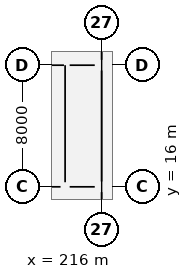
"""IFC4 building model, lengths in metres.
Left out: names, types, materials, properties, quantities, classifications, styles, units other than length and angle.
Written with IfcOpenShell. Run it as: python <this file> out.ifc"""

import sys

from ifc_helpers import new_model, si_unit, direction, frame, frame_2d, origin, origin_2d, place, context, subcontext, project, spatial, rectangle, extrude, element, fill, save


model = new_model("IFC4")
c1 = context("Model", 3, precision=1e-05, world=origin(), true_north=direction((0.0, 1.0)))
c2 = subcontext(c1, "Body", "Model", "MODEL_VIEW")
j1 = project(units=[si_unit("LENGTHUNIT", "METRE"), si_unit("PLANEANGLEUNIT", "RADIAN")], contexts=[c1])
p1 = place(None, origin())
s1 = spatial("IfcSite", under=j1, at=p1, CompositionType="ELEMENT")
p2 = place(p1, origin())
s2 = spatial("IfcBuilding", under=s1, at=p2, CompositionType="ELEMENT")
p3 = place(p2, origin())
s3 = spatial("IfcBuildingStorey", under=s2, at=p3, CompositionType="ELEMENT", Elevation=0.0)
for number, where, z_axis, x_axis in (
    (1, (216.0, 16.0, -0.5), (0.0, 0.0, 1.0), (1.0, 0.0, 0.0)),
    (2, (216.0, 24.0, -0.5), (0.0, 0.0, 1.0), (1.0, 0.0, 0.0)),
):
    element("IfcColumn", number, at=place(p3, frame(where, z_axis=z_axis, x_axis=x_axis)), inside=s3, PredefinedType="COLUMN", context=c2, shape_type="SweptSolid", body=[
        extrude(rectangle(XDim=0.7, YDim=0.7, at=origin_2d()), origin(), (0.0, 0.0, 1.0), 6.8),
    ])
p4 = place(p3, frame((216.0, 8.35, 0.0), z_axis=(0.0, 0.0, 1.0), x_axis=(0.0, 1.0, 0.0)))
e3 = element("IfcWall", 3, at=p4, inside=s3, PredefinedType="SOLIDWALL", context=c2, shape_type="SweptSolid", body=[
    extrude(rectangle(XDim=7.3, YDim=0.34, at=frame_2d((3.65, 0.0))), origin(), (0.0, 0.0, 1.0), 5.1),
])
p5 = place(p4, frame((1.433, 0.0, 0.85)))
e4 = element("IfcOpeningElement", 4, at=p5, cuts=e3, PredefinedType="OPENING", context=c2, shape_type="SweptSolid", body=[
    extrude(rectangle(XDim=2.0, YDim=3.3, at=frame_2d((1.0, 1.65))), frame((0.0, 0.18, 0.0), z_axis=(0.0, -1.0, 0.0), x_axis=(1.0, 0.0, 0.0)), (0.0, 0.0, 1.0), 0.36),
])
p6 = place(p4, frame((3.867, 0.0, 0.85)))
e5 = element("IfcOpeningElement", 5, at=p6, cuts=e3, PredefinedType="OPENING", context=c2, shape_type="SweptSolid", body=[
    extrude(rectangle(XDim=2.0, YDim=3.3, at=frame_2d((1.0, 1.65))), frame((0.0, 0.18, 0.0), z_axis=(0.0, -1.0, 0.0), x_axis=(1.0, 0.0, 0.0)), (0.0, 0.0, 1.0), 0.36),
])
p7 = place(p3, frame((216.0, 16.35, 0.0), z_axis=(0.0, 0.0, 1.0), x_axis=(0.0, 1.0, 0.0)))
e6 = element("IfcWall", 6, at=p7, inside=s3, PredefinedType="SOLIDWALL", context=c2, shape_type="SweptSolid", body=[
    extrude(rectangle(XDim=7.3, YDim=0.34, at=frame_2d((3.65, 0.0))), origin(), (0.0, 0.0, 1.0), 5.1),
])
p8 = place(p7, frame((2.45, 0.0, 0.0)))
e7 = element("IfcOpeningElement", 7, at=p8, cuts=e6, PredefinedType="OPENING", context=c2, shape_type="SweptSolid", body=[
    extrude(rectangle(XDim=2.4, YDim=3.1, at=frame_2d((1.2, 1.55))), frame((0.0, 0.18, 0.0), z_axis=(0.0, -1.0, 0.0), x_axis=(1.0, 0.0, 0.0)), (0.0, 0.0, 1.0), 0.36),
])
p9 = place(p3, frame((216.0, 24.35, 0.0), z_axis=(0.0, 0.0, 1.0), x_axis=(0.0, 1.0, 0.0)))
e8 = element("IfcWall", 8, at=p9, inside=s3, PredefinedType="SOLIDWALL", context=c2, shape_type="SweptSolid", body=[
    extrude(rectangle(XDim=7.3, YDim=0.34, at=frame_2d((3.65, 0.0))), origin(), (0.0, 0.0, 1.0), 5.1),
])
p10 = place(p9, frame((0.937, 0.0, 0.85)))
e9 = element("IfcOpeningElement", 9, at=p10, cuts=e8, PredefinedType="OPENING", context=c2, shape_type="SweptSolid", body=[
    extrude(rectangle(XDim=2.0, YDim=3.3, at=frame_2d((1.0, 1.65))), frame((0.0, 0.18, 0.0), z_axis=(0.0, -1.0, 0.0), x_axis=(1.0, 0.0, 0.0)), (0.0, 0.0, 1.0), 0.36),
])
p11 = place(p9, frame((3.867, 0.0, 0.85)))
e10 = element("IfcOpeningElement", 10, at=p11, cuts=e8, PredefinedType="OPENING", context=c2, shape_type="SweptSolid", body=[
    extrude(rectangle(XDim=2.0, YDim=3.3, at=frame_2d((1.0, 1.65))), frame((0.0, 0.18, 0.0), z_axis=(0.0, -1.0, 0.0), x_axis=(1.0, 0.0, 0.0)), (0.0, 0.0, 1.0), 0.36),
])
p12 = place(p3, frame((211.8, 16.0, 0.0), z_axis=(0.0, 0.0, 1.0), x_axis=(1.0, 0.0, 0.0)))
e11 = element("IfcWall", 11, at=p12, inside=s3, PredefinedType="PARTITIONING", context=c2, shape_type="SweptSolid", body=[
    extrude(rectangle(XDim=1.5, YDim=0.135, at=frame_2d((0.75, 0.0))), origin(), (0.0, 0.0, 1.0), 5.25),
])
p13 = place(p3, frame((213.9, 16.0, 0.0), z_axis=(0.0, 0.0, 1.0), x_axis=(1.0, 0.0, 0.0)))
e12 = element("IfcWall", 12, at=p13, inside=s3, PredefinedType="PARTITIONING", context=c2, shape_type="SweptSolid", body=[
    extrude(rectangle(XDim=1.65, YDim=0.14, at=frame_2d((0.825, 0.0))), origin(), (0.0, 0.0, 1.0), 5.25),
])
p14 = place(p3, frame((211.8, 24.0, 0.0), z_axis=(0.0, 0.0, 1.0), x_axis=(1.0, 0.0, 0.0)))
e13 = element("IfcWall", 13, at=p14, inside=s3, PredefinedType="PARTITIONING", context=c2, shape_type="SweptSolid", body=[
    extrude(rectangle(XDim=1.725, YDim=0.135, at=frame_2d((0.862, 0.0))), origin(), (0.0, 0.0, 1.0), 5.1),
])
p15 = place(p14, frame((0.225, 0.0, 0.0)))
e14 = element("IfcOpeningElement", 14, at=p15, cuts=e13, PredefinedType="OPENING", context=c2, shape_type="SweptSolid", body=[
    extrude(rectangle(XDim=1.05, YDim=2.15, at=frame_2d((0.525, 1.075))), frame((0.0, 0.077, 0.0), z_axis=(0.0, -1.0, 0.0), x_axis=(1.0, 0.0, 0.0)), (0.0, 0.0, 1.0), 0.155),
])
p16 = place(p3, frame((213.9, 24.0, 0.0), z_axis=(0.0, 0.0, 1.0), x_axis=(1.0, 0.0, 0.0)))
e15 = element("IfcWall", 15, at=p16, inside=s3, PredefinedType="PARTITIONING", context=c2, shape_type="SweptSolid", body=[
    extrude(rectangle(XDim=1.65, YDim=0.14, at=frame_2d((0.825, 0.0))), origin(), (0.0, 0.0, 1.0), 5.1),
])
p17 = place(p16, frame((0.315, 0.0, 0.0)))
e16 = element("IfcOpeningElement", 16, at=p17, cuts=e15, PredefinedType="OPENING", context=c2, shape_type="SweptSolid", body=[
    extrude(rectangle(XDim=1.02, YDim=2.18, at=frame_2d((0.51, 1.09))), frame((0.0, 0.08, 0.0), z_axis=(0.0, -1.0, 0.0), x_axis=(1.0, 0.0, 0.0)), (0.0, 0.0, 1.0), 0.16),
])
p18 = place(p3, frame((213.6, 16.3, 0.0), z_axis=(0.0, 0.0, 1.0), x_axis=(0.0, 1.0, 0.0)))
e17 = element("IfcWall", 17, at=p18, inside=s3, PredefinedType="PARTITIONING", context=c2, shape_type="SweptSolid", body=[
    extrude(rectangle(XDim=7.7, YDim=0.15, at=frame_2d((3.85, 0.0))), origin(), (0.0, 0.0, 1.0), 5.95),
])
p19 = place(p8, origin())
e18 = element("IfcDoor", 18, at=p19, inside=s3, OperationType="DOUBLE_DOOR_SINGLE_SWING", PredefinedType="DOOR", context=c2, shape_type="SweptSolid", body=[
    extrude(rectangle(XDim=2.4, YDim=3.1, at=frame_2d((1.2, 1.55))), frame((0.0, 0.025, 0.0), z_axis=(0.0, -1.0, 0.0), x_axis=(1.0, 0.0, 0.0)), (0.0, 0.0, 1.0), 0.05),
])
fill(e7, e18)
p20 = place(p15, origin())
e19 = element("IfcDoor", 19, at=p20, inside=s3, OperationType="SINGLE_SWING_RIGHT", PredefinedType="DOOR", context=c2, shape_type="SweptSolid", body=[
    extrude(rectangle(XDim=1.05, YDim=2.15, at=frame_2d((0.525, 1.075))), frame((0.0, 0.025, 0.0), z_axis=(0.0, -1.0, 0.0), x_axis=(1.0, 0.0, 0.0)), (0.0, 0.0, 1.0), 0.05),
])
fill(e14, e19)
p21 = place(p17, origin())
e20 = element("IfcDoor", 20, at=p21, inside=s3, OperationType="SINGLE_SWING_LEFT", PredefinedType="DOOR", context=c2, shape_type="SweptSolid", body=[
    extrude(rectangle(XDim=1.02, YDim=2.18, at=frame_2d((0.51, 1.09))), frame((0.0, 0.025, 0.0), z_axis=(0.0, -1.0, 0.0), x_axis=(1.0, 0.0, 0.0)), (0.0, 0.0, 1.0), 0.05),
])
fill(e16, e20)
save(model, sys.argv[1])
